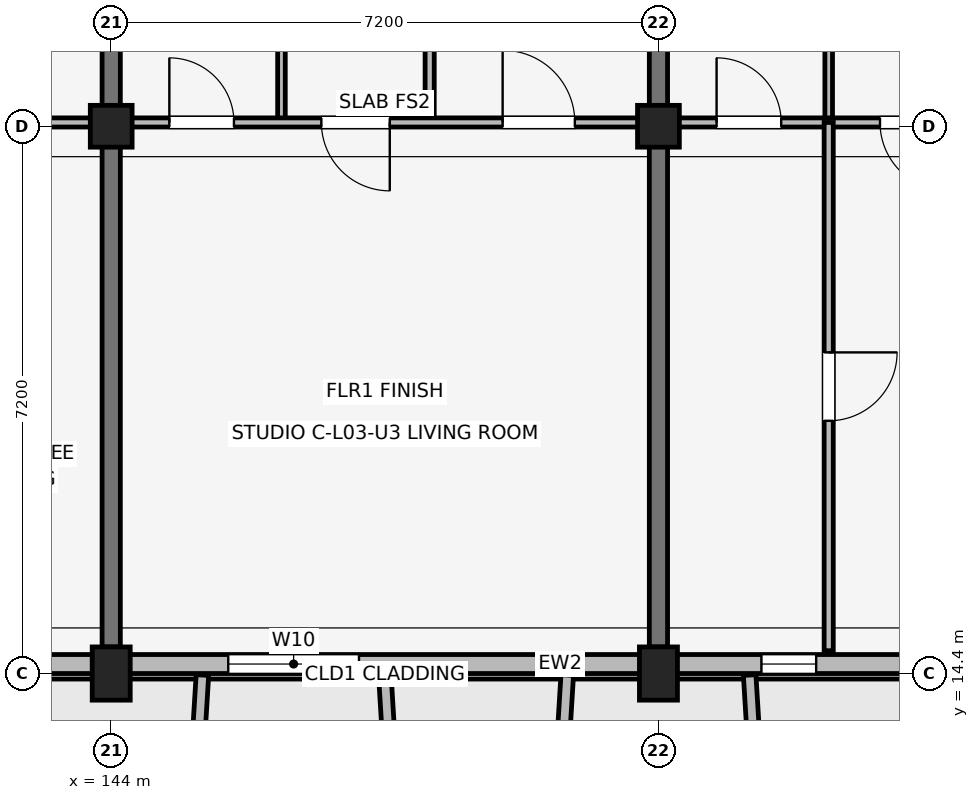
"""IFC4 building model, lengths in metres.
Left out: names, types, materials, properties, quantities, classifications, styles, units other than length and angle.
Written with IfcOpenShell. Run it as: python <this file> out.ifc"""

import sys

from ifc_helpers import new_model, si_unit, direction, frame, frame_2d, origin, origin_2d, place, context, subcontext, project, spatial, rectangle, extrude, element, fill, save


model = new_model("IFC4")
c1 = context("Model", 3, precision=1e-05, world=origin(), true_north=direction((0.0, 1.0)))
c2 = subcontext(c1, "Body", "Model", "MODEL_VIEW")
j1 = project(units=[si_unit("LENGTHUNIT", "METRE"), si_unit("PLANEANGLEUNIT", "RADIAN")], contexts=[c1])
p1 = place(None, origin())
s1 = spatial("IfcSite", under=j1, at=p1, CompositionType="ELEMENT")
p2 = place(p1, origin())
s2 = spatial("IfcBuilding", under=s1, at=p2, CompositionType="ELEMENT")
p3 = place(p2, frame((0.0, 0.0, 11.85)))
s3 = spatial("IfcBuildingStorey", under=s2, at=p3, CompositionType="ELEMENT", Elevation=11.85)
p4 = place(p3, frame((144.0, 14.4, 0.0), z_axis=(0.0, 0.0, 1.0), x_axis=(1.0, 0.0, 0.0)))
e1 = element("IfcColumn", 1, at=p4, inside=s3, PredefinedType="COLUMN", context=c2, shape_type="SweptSolid", body=[
    extrude(rectangle(XDim=0.5, YDim=0.7, at=origin_2d()), origin(), (0.0, 0.0, 1.0), 3.15),
])
p5 = place(p3, frame((144.0, 21.6, 0.0), z_axis=(0.0, 0.0, 1.0), x_axis=(1.0, 0.0, 0.0)))
e2 = element("IfcColumn", 2, at=p5, inside=s3, PredefinedType="COLUMN", context=c2, shape_type="SweptSolid", body=[
    extrude(rectangle(XDim=0.55, YDim=0.55, at=origin_2d()), origin(), (0.0, 0.0, 1.0), 3.15),
])
p6 = place(p3, frame((151.2, 14.4, 0.0), z_axis=(0.0, 0.0, 1.0), x_axis=(1.0, 0.0, 0.0)))
e3 = element("IfcColumn", 3, at=p6, inside=s3, PredefinedType="COLUMN", context=c2, shape_type="SweptSolid", body=[
    extrude(rectangle(XDim=0.5, YDim=0.7, at=origin_2d()), origin(), (0.0, 0.0, 1.0), 3.15),
])
p7 = place(p3, frame((151.2, 21.6, 0.0), z_axis=(0.0, 0.0, 1.0), x_axis=(1.0, 0.0, 0.0)))
e4 = element("IfcColumn", 4, at=p7, inside=s3, PredefinedType="COLUMN", context=c2, shape_type="SweptSolid", body=[
    extrude(rectangle(XDim=0.55, YDim=0.55, at=origin_2d()), origin(), (0.0, 0.0, 1.0), 3.15),
])
for number, where, z_axis, x_axis in (
    (5, (144.0, 14.75, 0.0), (0.0, 0.0, 1.0), (0.0, 1.0, 0.0)),
    (6, (151.2, 14.75, 0.0), (0.0, 0.0, 1.0), (0.0, 1.0, 0.0)),
):
    element("IfcWall", number, at=place(p3, frame(where, z_axis=z_axis, x_axis=x_axis)), inside=s3, PredefinedType="SHEAR", context=c2, shape_type="SweptSolid", body=[
        extrude(rectangle(XDim=9.4, YDim=0.24, at=frame_2d((4.7, 0.0))), origin(), (0.0, 0.0, 1.0), 3.15),
    ])
p8 = place(p3, frame((132.6, 14.525, 0.0), z_axis=(0.0, 0.0, 1.0), x_axis=(1.0, 0.0, 0.0)))
e7 = element("IfcWall", 7, at=p8, inside=s3, PredefinedType="SOLIDWALL", context=c2, shape_type="SweptSolid", body=[
    extrude(rectangle(XDim=30.0, YDim=0.25, at=frame_2d((15.0, 0.0))), origin(), (0.0, 0.0, 1.0), 2.43),
])
p9 = place(p8, frame((9.9, 0.0, 0.0), z_axis=(0.0, 0.0, 1.0), x_axis=(-1.0, 0.0, 0.0)))
e8 = element("IfcOpeningElement", 8, at=p9, cuts=e7, PredefinedType="OPENING", context=c2, shape_type="SweptSolid", body=[
    extrude(rectangle(XDim=1.8, YDim=2.15, at=frame_2d((0.9, 1.075))), frame((0.0, 0.135, 0.0), z_axis=(0.0, -1.0, 0.0), x_axis=(1.0, 0.0, 0.0)), (0.0, 0.0, 1.0), 0.27),
])
p10 = place(p8, frame((24.225, 0.0, 0.0), z_axis=(0.0, 0.0, 1.0), x_axis=(-1.0, 0.0, 0.0)))
e9 = element("IfcOpeningElement", 9, at=p10, cuts=e7, PredefinedType="OPENING", context=c2, shape_type="SweptSolid", body=[
    extrude(rectangle(XDim=1.65, YDim=2.15, at=frame_2d((0.825, 1.075))), frame((0.0, 0.135, 0.0), z_axis=(0.0, -1.0, 0.0), x_axis=(1.0, 0.0, 0.0)), (0.0, 0.0, 1.0), 0.27),
])
p11 = place(p8, frame((1.215, 0.0, 0.75)))
e10 = element("IfcOpeningElement", 10, at=p11, cuts=e7, PredefinedType="OPENING", context=c2, shape_type="SweptSolid", body=[
    extrude(rectangle(XDim=1.34, YDim=1.55, at=frame_2d((0.67, 0.775))), frame((0.0, 0.135, 0.0), z_axis=(0.0, -1.0, 0.0), x_axis=(1.0, 0.0, 0.0)), (0.0, 0.0, 1.0), 0.27),
])
p12 = place(p8, frame((5.555, 0.0, 0.75)))
e11 = element("IfcOpeningElement", 11, at=p12, cuts=e7, PredefinedType="OPENING", context=c2, shape_type="SweptSolid", body=[
    extrude(rectangle(XDim=0.72, YDim=1.35, at=frame_2d((0.36, 0.675))), frame((0.0, 0.135, 0.0), z_axis=(0.0, -1.0, 0.0), x_axis=(1.0, 0.0, 0.0)), (0.0, 0.0, 1.0), 0.27),
])
p13 = place(p8, frame((12.94, 0.0, 0.7)))
e12 = element("IfcOpeningElement", 12, at=p13, cuts=e7, PredefinedType="OPENING", context=c2, shape_type="SweptSolid", body=[
    extrude(rectangle(XDim=1.72, YDim=1.6, at=frame_2d((0.86, 0.8))), frame((0.0, 0.135, 0.0), z_axis=(0.0, -1.0, 0.0), x_axis=(1.0, 0.0, 0.0)), (0.0, 0.0, 1.0), 0.27),
])
p14 = place(p8, frame((19.955, 0.0, 0.75)))
e13 = element("IfcOpeningElement", 13, at=p14, cuts=e7, PredefinedType="OPENING", context=c2, shape_type="SweptSolid", body=[
    extrude(rectangle(XDim=0.72, YDim=1.35, at=frame_2d((0.36, 0.675))), frame((0.0, 0.135, 0.0), z_axis=(0.0, -1.0, 0.0), x_axis=(1.0, 0.0, 0.0)), (0.0, 0.0, 1.0), 0.27),
])
p15 = place(p8, frame((27.2, 0.0, 0.67)))
e14 = element("IfcOpeningElement", 14, at=p15, cuts=e7, PredefinedType="OPENING", context=c2, shape_type="SweptSolid", body=[
    extrude(rectangle(XDim=2.0, YDim=1.65, at=frame_2d((1.0, 0.825))), frame((0.0, 0.135, 0.0), z_axis=(0.0, -1.0, 0.0), x_axis=(1.0, 0.0, 0.0)), (0.0, 0.0, 1.0), 0.27),
])
for number, where, z_axis, x_axis in (
    (15, (145.2, 14.38, 0.0), (0.0, 0.0, 1.0), (-0.061, -0.998, 0.0)),
    (16, (147.6, 14.38, 0.0), (0.0, 0.0, 1.0), (0.061, -0.998, 0.0)),
    (17, (150.0, 14.38, 0.0), (0.0, 0.0, 1.0), (-0.061, -0.998, 0.0)),
):
    element("IfcWall", number, at=place(p3, frame(where, z_axis=z_axis, x_axis=x_axis)), inside=s3, PredefinedType="ELEMENTEDWALL", context=c2, shape_type="SweptSolid", body=[
        extrude(rectangle(XDim=1.964, YDim=0.165, at=frame_2d((0.982, 0.0))), origin(), (0.0, 0.0, 1.0), 2.55),
    ])
p16 = place(p3, frame((152.4, 14.38, 0.0), z_axis=(0.0, 0.0, 1.0), x_axis=(0.061170732449, -0.998127317276, 0.0)))
e18 = element("IfcWall", 18, at=p16, inside=s3, PredefinedType="ELEMENTEDWALL", context=c2, shape_type="SweptSolid", body=[
    extrude(rectangle(XDim=1.964, YDim=0.165, at=frame_2d((0.982, 0.0))), origin(), (0.0, 0.0, 1.0), 2.58),
])
p17 = place(p3, frame((136.94, 21.65, 0.0), z_axis=(0.0, 0.0, 1.0), x_axis=(1.0, 0.0, 0.0)))
e19 = element("IfcWall", 19, at=p17, inside=s3, PredefinedType="PARTITIONING", context=c2, shape_type="SweptSolid", body=[
    extrude(rectangle(XDim=6.92, YDim=0.12, at=frame_2d((3.46, 0.0))), origin(), (0.0, 0.0, 1.0), 2.375),
])
p18 = place(p17, frame((1.475, 0.0, 0.0), z_axis=(0.0, 0.0, 1.0), x_axis=(-1.0, 0.0, 0.0)))
e20 = element("IfcOpeningElement", 20, at=p18, cuts=e19, PredefinedType="OPENING", context=c2, shape_type="SweptSolid", body=[
    extrude(rectangle(XDim=0.85, YDim=2.08, at=frame_2d((0.425, 1.04))), frame((0.0, 0.07, 0.0), z_axis=(0.0, -1.0, 0.0), x_axis=(1.0, 0.0, 0.0)), (0.0, 0.0, 1.0), 0.14),
])
p19 = place(p17, frame((2.775, 0.0, 0.0)))
e21 = element("IfcOpeningElement", 21, at=p19, cuts=e19, PredefinedType="OPENING", context=c2, shape_type="SweptSolid", body=[
    extrude(rectangle(XDim=0.9, YDim=2.08, at=frame_2d((0.45, 1.04))), frame((0.0, 0.07, 0.0), z_axis=(0.0, -1.0, 0.0), x_axis=(1.0, 0.0, 0.0)), (0.0, 0.0, 1.0), 0.14),
])
p20 = place(p17, frame((6.11, 0.0, 0.0), z_axis=(0.0, 0.0, 1.0), x_axis=(-1.0, 0.0, 0.0)))
e22 = element("IfcOpeningElement", 22, at=p20, cuts=e19, PredefinedType="OPENING", context=c2, shape_type="SweptSolid", body=[
    extrude(rectangle(XDim=0.95, YDim=2.08, at=frame_2d((0.475, 1.04))), frame((0.0, 0.07, 0.0), z_axis=(0.0, -1.0, 0.0), x_axis=(1.0, 0.0, 0.0)), (0.0, 0.0, 1.0), 0.14),
])
p21 = place(p3, frame((146.24, 21.65, 0.0), z_axis=(0.0, 0.0, 1.0), x_axis=(0.0, 1.0, 0.0)))
e23 = element("IfcWall", 23, at=p21, inside=s3, PredefinedType="PARTITIONING", context=c2, shape_type="SweptSolid", body=[
    extrude(rectangle(XDim=2.65, YDim=0.1, at=frame_2d((1.325, 0.0))), origin(), (0.0, 0.0, 1.0), 2.375),
])
p22 = place(p3, frame((148.19, 21.65, 0.0), z_axis=(0.0, 0.0, 1.0), x_axis=(0.0, 1.0, 0.0)))
e24 = element("IfcWall", 24, at=p22, inside=s3, PredefinedType="PARTITIONING", context=c2, shape_type="SweptSolid", body=[
    extrude(rectangle(XDim=2.65, YDim=0.12, at=frame_2d((1.325, 0.0))), origin(), (0.0, 0.0, 1.0), 2.375),
])
p23 = place(p3, frame((144.14, 21.65, 0.0), z_axis=(0.0, 0.0, 1.0), x_axis=(1.0, 0.0, 0.0)))
e25 = element("IfcWall", 25, at=p23, inside=s3, PredefinedType="PARTITIONING", context=c2, shape_type="SweptSolid", body=[
    extrude(rectangle(XDim=6.92, YDim=0.12, at=frame_2d((3.46, 0.0))), origin(), (0.0, 0.0, 1.0), 2.375),
])
p24 = place(p23, frame((0.625, 0.0, 0.0)))
e26 = element("IfcOpeningElement", 26, at=p24, cuts=e25, PredefinedType="OPENING", context=c2, shape_type="SweptSolid", body=[
    extrude(rectangle(XDim=0.85, YDim=2.08, at=frame_2d((0.425, 1.04))), frame((0.0, 0.07, 0.0), z_axis=(0.0, -1.0, 0.0), x_axis=(1.0, 0.0, 0.0)), (0.0, 0.0, 1.0), 0.14),
])
p25 = place(p23, frame((3.525, 0.0, 0.0), z_axis=(0.0, 0.0, 1.0), x_axis=(-1.0, 0.0, 0.0)))
e27 = element("IfcOpeningElement", 27, at=p25, cuts=e25, PredefinedType="OPENING", context=c2, shape_type="SweptSolid", body=[
    extrude(rectangle(XDim=0.9, YDim=2.08, at=frame_2d((0.45, 1.04))), frame((0.0, 0.07, 0.0), z_axis=(0.0, -1.0, 0.0), x_axis=(1.0, 0.0, 0.0)), (0.0, 0.0, 1.0), 0.14),
])
p26 = place(p23, frame((5.01, 0.0, 0.0)))
e28 = element("IfcOpeningElement", 28, at=p26, cuts=e25, PredefinedType="OPENING", context=c2, shape_type="SweptSolid", body=[
    extrude(rectangle(XDim=0.95, YDim=2.08, at=frame_2d((0.475, 1.04))), frame((0.0, 0.07, 0.0), z_axis=(0.0, -1.0, 0.0), x_axis=(1.0, 0.0, 0.0)), (0.0, 0.0, 1.0), 0.14),
])
p27 = place(p3, frame((153.44, 21.65, 0.0), z_axis=(0.0, 0.0, 1.0), x_axis=(0.0, 1.0, 0.0)))
e29 = element("IfcWall", 29, at=p27, inside=s3, PredefinedType="PARTITIONING", context=c2, shape_type="SweptSolid", body=[
    extrude(rectangle(XDim=2.65, YDim=0.1, at=frame_2d((1.325, 0.0))), origin(), (0.0, 0.0, 1.0), 2.375),
])
p28 = place(p3, frame((151.34, 21.65, 0.0), z_axis=(0.0, 0.0, 1.0), x_axis=(1.0, 0.0, 0.0)))
e30 = element("IfcWall", 30, at=p28, inside=s3, PredefinedType="PARTITIONING", context=c2, shape_type="SweptSolid", body=[
    extrude(rectangle(XDim=6.92, YDim=0.12, at=frame_2d((3.46, 0.0))), origin(), (0.0, 0.0, 1.0), 2.375),
])
p29 = place(p28, frame((0.625, 0.0, 0.0)))
e31 = element("IfcOpeningElement", 31, at=p29, cuts=e30, PredefinedType="OPENING", context=c2, shape_type="SweptSolid", body=[
    extrude(rectangle(XDim=0.85, YDim=2.08, at=frame_2d((0.425, 1.04))), frame((0.0, 0.07, 0.0), z_axis=(0.0, -1.0, 0.0), x_axis=(1.0, 0.0, 0.0)), (0.0, 0.0, 1.0), 0.14),
])
p30 = place(p28, frame((3.675, 0.0, 0.0), z_axis=(0.0, 0.0, 1.0), x_axis=(-1.0, 0.0, 0.0)))
e32 = element("IfcOpeningElement", 32, at=p30, cuts=e30, PredefinedType="OPENING", context=c2, shape_type="SweptSolid", body=[
    extrude(rectangle(XDim=0.9, YDim=2.08, at=frame_2d((0.45, 1.04))), frame((0.0, 0.07, 0.0), z_axis=(0.0, -1.0, 0.0), x_axis=(1.0, 0.0, 0.0)), (0.0, 0.0, 1.0), 0.14),
])
p31 = place(p28, frame((5.16, 0.0, 0.0)))
e33 = element("IfcOpeningElement", 33, at=p31, cuts=e30, PredefinedType="OPENING", context=c2, shape_type="SweptSolid", body=[
    extrude(rectangle(XDim=0.95, YDim=2.08, at=frame_2d((0.475, 1.04))), frame((0.0, 0.07, 0.0), z_axis=(0.0, -1.0, 0.0), x_axis=(1.0, 0.0, 0.0)), (0.0, 0.0, 1.0), 0.14),
])
p32 = place(p3, frame((153.44, 14.7, 0.0), z_axis=(0.0, 0.0, 1.0), x_axis=(0.0, 1.0, 0.0)))
e34 = element("IfcWall", 34, at=p32, inside=s3, PredefinedType="PARTITIONING", context=c2, shape_type="SweptSolid", body=[
    extrude(rectangle(XDim=6.95, YDim=0.12, at=frame_2d((3.475, 0.0))), origin(), (0.0, 0.0, 1.0), 2.375),
])
p33 = place(p32, frame((3.925, 0.0, 0.0), z_axis=(0.0, 0.0, 1.0), x_axis=(-1.0, 0.0, 0.0)))
e35 = element("IfcOpeningElement", 35, at=p33, cuts=e34, PredefinedType="OPENING", context=c2, shape_type="SweptSolid", body=[
    extrude(rectangle(XDim=0.9, YDim=2.08, at=frame_2d((0.45, 1.04))), frame((0.0, 0.07, 0.0), z_axis=(0.0, -1.0, 0.0), x_axis=(1.0, 0.0, 0.0)), (0.0, 0.0, 1.0), 0.14),
])
p34 = place(p13, origin())
e36 = element("IfcWindow", 36, at=p34, inside=s3, PartitioningType="SINGLE_PANEL", PredefinedType="WINDOW", context=c2, shape_type="SweptSolid", body=[
    extrude(rectangle(XDim=1.72, YDim=1.6, at=frame_2d((0.86, 0.8))), frame((0.0, 0.03, 0.0), z_axis=(0.0, -1.0, 0.0), x_axis=(1.0, 0.0, 0.0)), (0.0, 0.0, 1.0), 0.06),
])
fill(e12, e36)
p35 = place(p14, origin())
e37 = element("IfcWindow", 37, at=p35, inside=s3, PartitioningType="SINGLE_PANEL", PredefinedType="WINDOW", context=c2, shape_type="SweptSolid", body=[
    extrude(rectangle(XDim=0.72, YDim=1.35, at=frame_2d((0.36, 0.675))), frame((0.0, 0.03, 0.0), z_axis=(0.0, -1.0, 0.0), x_axis=(1.0, 0.0, 0.0)), (0.0, 0.0, 1.0), 0.06),
])
fill(e13, e37)
p36 = place(p24, origin())
e38 = element("IfcDoor", 38, at=p36, inside=s3, OperationType="SINGLE_SWING_LEFT", PredefinedType="DOOR", context=c2, shape_type="SweptSolid", body=[
    extrude(rectangle(XDim=0.85, YDim=2.08, at=frame_2d((0.425, 1.04))), frame((0.0, 0.025, 0.0), z_axis=(0.0, -1.0, 0.0), x_axis=(1.0, 0.0, 0.0)), (0.0, 0.0, 1.0), 0.05),
])
fill(e26, e38)
p37 = place(p25, origin())
e39 = element("IfcDoor", 39, at=p37, inside=s3, OperationType="SINGLE_SWING_RIGHT", PredefinedType="DOOR", context=c2, shape_type="SweptSolid", body=[
    extrude(rectangle(XDim=0.9, YDim=2.08, at=frame_2d((0.45, 1.04))), frame((0.0, 0.025, 0.0), z_axis=(0.0, -1.0, 0.0), x_axis=(1.0, 0.0, 0.0)), (0.0, 0.0, 1.0), 0.05),
])
fill(e27, e39)
p38 = place(p26, origin())
e40 = element("IfcDoor", 40, at=p38, inside=s3, OperationType="SINGLE_SWING_LEFT", PredefinedType="DOOR", context=c2, shape_type="SweptSolid", body=[
    extrude(rectangle(XDim=0.95, YDim=2.08, at=frame_2d((0.475, 1.04))), frame((0.0, 0.025, 0.0), z_axis=(0.0, -1.0, 0.0), x_axis=(1.0, 0.0, 0.0)), (0.0, 0.0, 1.0), 0.05),
])
fill(e28, e40)
p39 = place(p29, origin())
e41 = element("IfcDoor", 41, at=p39, inside=s3, OperationType="SINGLE_SWING_LEFT", PredefinedType="DOOR", context=c2, shape_type="SweptSolid", body=[
    extrude(rectangle(XDim=0.85, YDim=2.08, at=frame_2d((0.425, 1.04))), frame((0.0, 0.025, 0.0), z_axis=(0.0, -1.0, 0.0), x_axis=(1.0, 0.0, 0.0)), (0.0, 0.0, 1.0), 0.05),
])
fill(e31, e41)
p40 = place(p30, origin())
e42 = element("IfcDoor", 42, at=p40, inside=s3, OperationType="SINGLE_SWING_RIGHT", PredefinedType="DOOR", context=c2, shape_type="SweptSolid", body=[
    extrude(rectangle(XDim=0.9, YDim=2.08, at=frame_2d((0.45, 1.04))), frame((0.0, 0.025, 0.0), z_axis=(0.0, -1.0, 0.0), x_axis=(1.0, 0.0, 0.0)), (0.0, 0.0, 1.0), 0.05),
])
fill(e32, e42)
p41 = place(p33, origin())
e43 = element("IfcDoor", 43, at=p41, inside=s3, OperationType="SINGLE_SWING_RIGHT", PredefinedType="DOOR", context=c2, shape_type="SweptSolid", body=[
    extrude(rectangle(XDim=0.9, YDim=2.08, at=frame_2d((0.45, 1.04))), frame((0.0, 0.025, 0.0), z_axis=(0.0, -1.0, 0.0), x_axis=(1.0, 0.0, 0.0)), (0.0, 0.0, 1.0), 0.05),
])
fill(e35, e43)
save(model, sys.argv[1])
